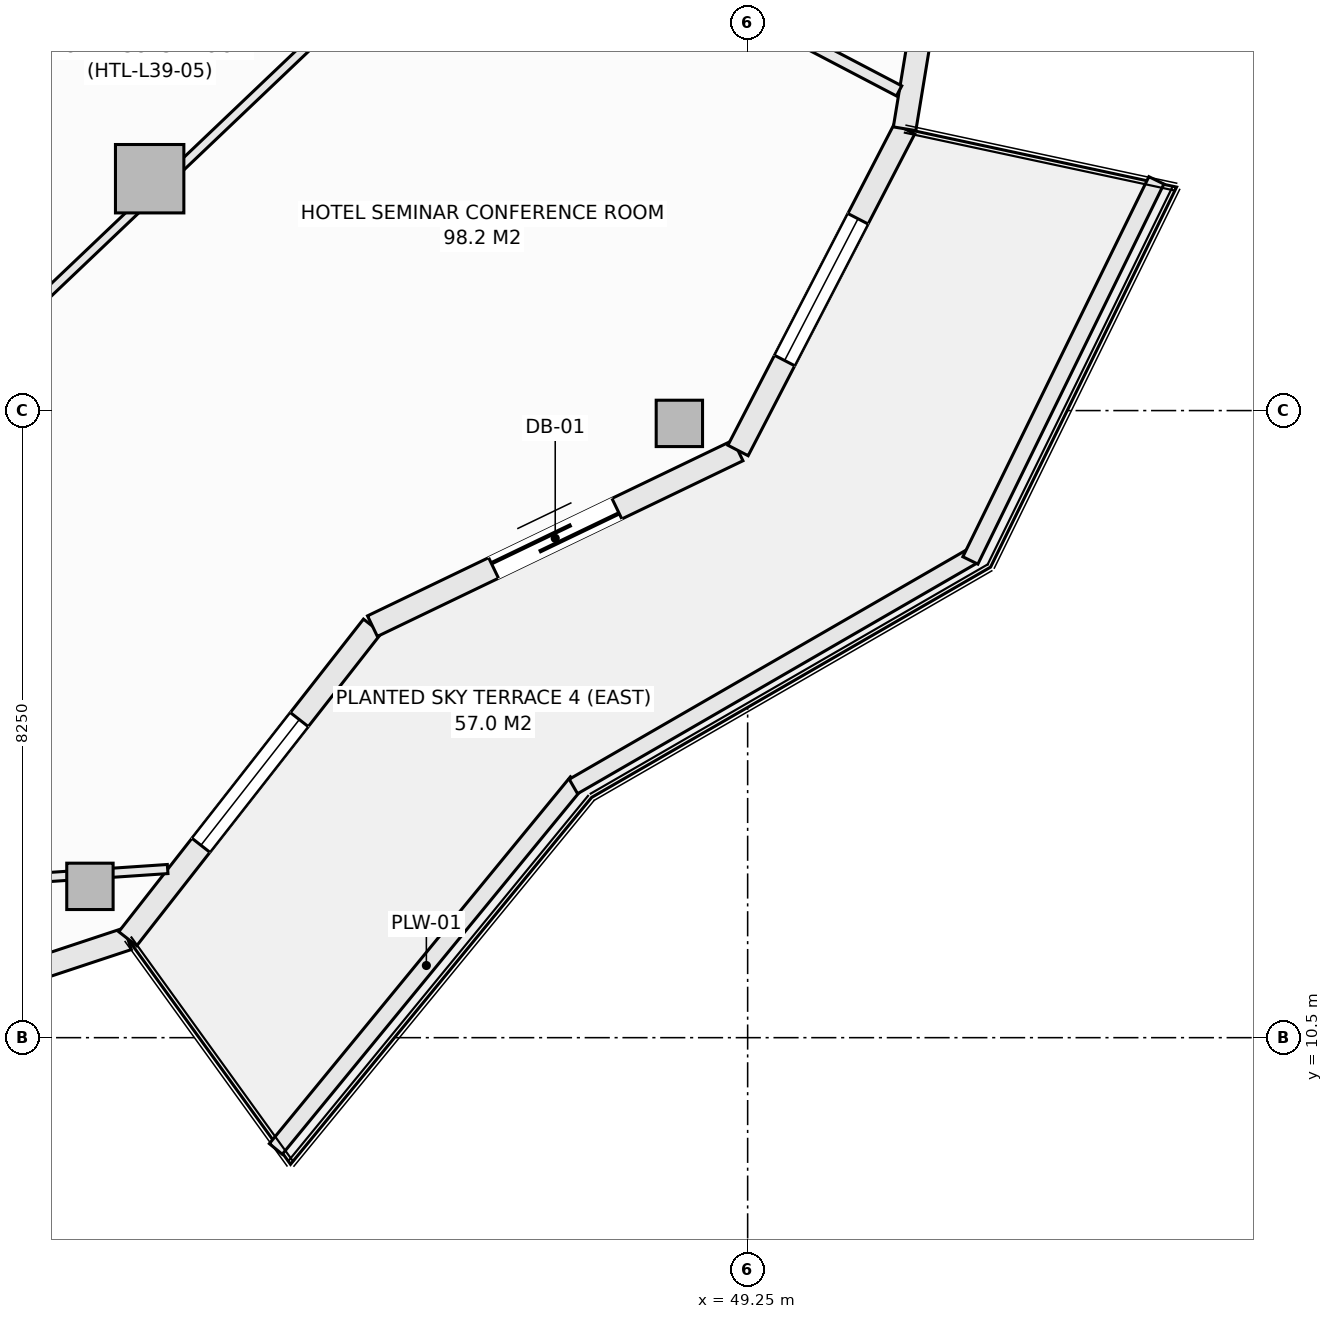
"""IFC4 building model, lengths in metres.
Left out: names, types, materials, properties, quantities, classifications, styles, units other than length and angle.
Written with IfcOpenShell. Run it as: python <this file> out.ifc"""

import sys

from ifc_helpers import new_model, si_unit, direction, frame, frame_2d, origin, origin_2d, place, context, subcontext, project, spatial, rectangle, hollow_rectangle, extrude, element, fill, save


model = new_model("IFC4")
c1 = context("Model", 3, precision=1e-05, world=origin(), true_north=direction((0.0, 1.0)))
c2 = subcontext(c1, "Body", "Model", "MODEL_VIEW")
j1 = project(units=[si_unit("LENGTHUNIT", "METRE"), si_unit("PLANEANGLEUNIT", "RADIAN")], contexts=[c1])
p1 = place(None, origin())
s1 = spatial("IfcSite", under=j1, at=p1, CompositionType="ELEMENT")
p2 = place(p1, origin())
s2 = spatial("IfcBuilding", under=s1, at=p2, CompositionType="ELEMENT")
p3 = place(p2, frame((0.0, 0.0, 152.9)))
s3 = spatial("IfcBuildingStorey", under=s2, at=p3, CompositionType="ELEMENT", Elevation=152.9)
for number, where, z_axis, x_axis in (
    (1, (40.596, 12.49, -0.27), (0.0, 0.0, 1.0), (1.0, 0.0, 0.0)),
    (2, (48.352, 18.581, -0.27), (0.0, 0.0, 1.0), (1.0, 0.0, 0.0)),
):
    element("IfcColumn", number, at=place(p3, frame(where, z_axis=z_axis, x_axis=x_axis)), inside=s3, PredefinedType="COLUMN", context=c2, shape_type="SweptSolid", body=[
        extrude(hollow_rectangle(XDim=0.61, YDim=0.61, WallThickness=0.025, at=origin_2d()), origin(), (0.0, 0.0, 1.0), 3.4),
    ])
p4 = place(p3, frame((41.382, 21.801, -0.27), z_axis=(0.0, 0.0, 1.0), x_axis=(1.0, 0.0, 0.0)))
e3 = element("IfcColumn", 3, at=p4, inside=s3, PredefinedType="COLUMN", context=c2, shape_type="SweptSolid", body=[
    extrude(rectangle(XDim=0.9, YDim=0.9, at=origin_2d()), origin(), (0.0, 0.0, 1.0), 3.4),
])
p5 = place(p3, frame((35.803, 10.048, 0.0), z_axis=(0.0, 0.0, 1.0), x_axis=(0.949246811547, 0.314532177636, 0.0)))
e4 = element("IfcWall", 4, at=p5, inside=s3, PredefinedType="SOLIDWALL", context=c2, shape_type="SweptSolid", body=[
    extrude(rectangle(XDim=5.574, YDim=0.3, at=frame_2d((2.787, 0.0))), origin(), (0.0, 0.0, 1.0), 2.653),
])
p6 = place(p5, frame((1.737, 0.0, 0.74)))
e5 = element("IfcOpeningElement", 5, at=p6, cuts=e4, PredefinedType="OPENING", context=c2, shape_type="SweptSolid", body=[
    extrude(rectangle(XDim=2.1, YDim=1.7, at=frame_2d((1.05, 0.85))), frame((0.0, 0.16, 0.0), z_axis=(0.0, -1.0, 0.0), x_axis=(1.0, 0.0, 0.0)), (0.0, 0.0, 1.0), 0.32),
])
p7 = place(p3, frame((41.094, 11.801, 0.0), z_axis=(0.0, 0.0, 1.0), x_axis=(0.616429245738, 0.787410302828, 0.0)))
e6 = element("IfcWall", 6, at=p7, inside=s3, PredefinedType="SOLIDWALL", context=c2, shape_type="SweptSolid", body=[
    extrude(rectangle(XDim=5.223, YDim=0.3, at=frame_2d((2.612, 0.0))), origin(), (0.0, 0.0, 1.0), 2.653),
])
p8 = place(p7, frame((1.562, 0.0, 0.74)))
e7 = element("IfcOpeningElement", 7, at=p8, cuts=e6, PredefinedType="OPENING", context=c2, shape_type="SweptSolid", body=[
    extrude(rectangle(XDim=2.1, YDim=1.7, at=frame_2d((1.05, 0.85))), frame((0.0, 0.16, 0.0), z_axis=(0.0, -1.0, 0.0), x_axis=(1.0, 0.0, 0.0)), (0.0, 0.0, 1.0), 0.32),
])
p9 = place(p3, frame((44.313, 15.914, 0.0), z_axis=(0.0, 0.0, 1.0), x_axis=(0.901353070301, 0.433085029363, 0.0)))
e8 = element("IfcWall", 8, at=p9, inside=s3, PredefinedType="SOLIDWALL", context=c2, shape_type="SweptSolid", body=[
    extrude(rectangle(XDim=5.336, YDim=0.3, at=frame_2d((2.668, 0.0))), origin(), (0.0, 0.0, 1.0), 2.653),
])
p10 = place(p9, frame((1.768, 0.0, 0.0)))
e9 = element("IfcOpeningElement", 9, at=p10, cuts=e8, PredefinedType="OPENING", context=c2, shape_type="SweptSolid", body=[
    extrude(rectangle(XDim=1.8, YDim=2.25, at=frame_2d((0.9, 1.125))), frame((0.0, 0.16, 0.0), z_axis=(0.0, -1.0, 0.0), x_axis=(1.0, 0.0, 0.0)), (0.0, 0.0, 1.0), 0.32),
])
p11 = place(p3, frame((49.123, 18.225, 0.0), z_axis=(0.0, 0.0, 1.0), x_axis=(0.459810251451, 0.888017191647, 0.0)))
e10 = element("IfcWall", 10, at=p11, inside=s3, PredefinedType="SOLIDWALL", context=c2, shape_type="SweptSolid", body=[
    extrude(rectangle(XDim=4.766, YDim=0.3, at=frame_2d((2.383, 0.0))), origin(), (0.0, 0.0, 1.0), 2.653),
])
p12 = place(p11, frame((1.333, 0.0, 0.74)))
e11 = element("IfcOpeningElement", 11, at=p12, cuts=e10, PredefinedType="OPENING", context=c2, shape_type="SweptSolid", body=[
    extrude(rectangle(XDim=2.1, YDim=1.7, at=frame_2d((1.05, 0.85))), frame((0.0, 0.16, 0.0), z_axis=(0.0, -1.0, 0.0), x_axis=(1.0, 0.0, 0.0)), (0.0, 0.0, 1.0), 0.32),
])
p13 = place(p3, frame((51.315, 22.458, 0.0), z_axis=(0.0, 0.0, 1.0), x_axis=(0.162394765401, 0.986725868806, 0.0)))
e12 = element("IfcWall", 12, at=p13, inside=s3, PredefinedType="SOLIDWALL", context=c2, shape_type="SweptSolid", body=[
    extrude(rectangle(XDim=4.603, YDim=0.3, at=frame_2d((2.302, 0.0))), origin(), (0.0, 0.0, 1.0), 2.653),
])
p14 = place(p13, frame((1.252, 0.0, 0.74)))
e13 = element("IfcOpeningElement", 13, at=p14, cuts=e12, PredefinedType="OPENING", context=c2, shape_type="SweptSolid", body=[
    extrude(rectangle(XDim=2.1, YDim=1.7, at=frame_2d((1.05, 0.85))), frame((0.0, 0.16, 0.0), z_axis=(0.0, -1.0, 0.0), x_axis=(1.0, 0.0, 0.0)), (0.0, 0.0, 1.0), 0.32),
])
p15 = place(p3, frame((43.042, 9.036, 0.0), z_axis=(0.0, 0.0, 1.0), x_axis=(0.634429234628, 0.77298094818, 0.0)))
e14 = element("IfcWall", 14, at=p15, inside=s3, PredefinedType="PARAPET", context=c2, shape_type="SweptSolid", body=[
    extrude(rectangle(XDim=6.245, YDim=0.22, at=frame_2d((3.123, 0.0))), origin(), (0.0, 0.0, 1.0), 0.52),
])
p16 = place(p3, frame((46.958, 13.805, 0.0), z_axis=(0.0, 0.0, 1.0), x_axis=(0.866058128659, 0.499943314571, 0.0)))
e15 = element("IfcWall", 15, at=p16, inside=s3, PredefinedType="PARAPET", context=c2, shape_type="SweptSolid", body=[
    extrude(rectangle(XDim=6.06, YDim=0.22, at=frame_2d((3.03, 0.0))), origin(), (0.0, 0.0, 1.0), 0.52),
])
p17 = place(p3, frame((52.18, 16.779, 0.0), z_axis=(0.0, 0.0, 1.0), x_axis=(0.439637174641, 0.898175458735, 0.0)))
e16 = element("IfcWall", 16, at=p17, inside=s3, PredefinedType="PARAPET", context=c2, shape_type="SweptSolid", body=[
    extrude(rectangle(XDim=5.567, YDim=0.22, at=frame_2d((2.784, 0.0))), origin(), (0.0, 0.0, 1.0), 0.52),
])
p18 = place(p3, frame((38.962, 29.386, 0.0), z_axis=(0.0, 0.0, 1.0), x_axis=(0.885905291329, -0.463866160434, 0.0)))
e17 = element("IfcWall", 17, at=p18, inside=s3, PredefinedType="PARTITIONING", context=c2, shape_type="SweptSolid", body=[
    extrude(rectangle(XDim=13.863, YDim=0.15, at=frame_2d((6.931, 0.0))), origin(), (0.0, 0.0, 1.0), 2.505),
])
p19 = place(p3, frame((39.021, 19.324, 0.0), z_axis=(0.0, 0.0, 1.0), x_axis=(0.724517158733, 0.689256763986, 0.0)))
e18 = element("IfcWall", 18, at=p19, inside=s3, PredefinedType="PARTITIONING", context=c2, shape_type="SweptSolid", body=[
    extrude(rectangle(XDim=9.306, YDim=0.12, at=frame_2d((4.653, 0.0))), origin(), (0.0, 0.0, 1.0), 2.505),
])
p20 = place(p3, frame((36.012, 12.34, 0.0), z_axis=(0.0, 0.0, 1.0), x_axis=(0.997733146572, 0.067294637466, 0.0)))
e19 = element("IfcWall", 19, at=p20, inside=s3, PredefinedType="PARTITIONING", context=c2, shape_type="SweptSolid", body=[
    extrude(rectangle(XDim=5.62, YDim=0.12, at=frame_2d((2.81, 0.0))), origin(), (0.0, 0.0, 1.0), 2.653),
])
p21 = place(p8, origin())
e20 = element("IfcWindow", 20, at=p21, inside=s3, PartitioningType="SINGLE_PANEL", PredefinedType="WINDOW", context=c2, shape_type="SweptSolid", body=[
    extrude(rectangle(XDim=2.1, YDim=1.7, at=frame_2d((1.05, 0.85))), frame((0.0, 0.03, 0.0), z_axis=(0.0, -1.0, 0.0), x_axis=(1.0, 0.0, 0.0)), (0.0, 0.0, 1.0), 0.06),
])
fill(e7, e20)
p22 = place(p10, frame((1.8, 0.0, 0.0), z_axis=(0.0, 0.0, 1.0), x_axis=(-1.0, 0.0, 0.0)))
e21 = element("IfcDoor", 21, at=p22, inside=s3, OperationType="SLIDING_TO_LEFT", PredefinedType="DOOR", context=c2, shape_type="SweptSolid", body=[
    extrude(rectangle(XDim=1.8, YDim=2.25, at=frame_2d((0.9, 1.125))), frame((0.0, 0.025, 0.0), z_axis=(0.0, -1.0, 0.0), x_axis=(1.0, 0.0, 0.0)), (0.0, 0.0, 1.0), 0.05),
])
fill(e9, e21)
p23 = place(p12, origin())
e22 = element("IfcWindow", 22, at=p23, inside=s3, PartitioningType="SINGLE_PANEL", PredefinedType="WINDOW", context=c2, shape_type="SweptSolid", body=[
    extrude(rectangle(XDim=2.1, YDim=1.7, at=frame_2d((1.05, 0.85))), frame((0.0, 0.03, 0.0), z_axis=(0.0, -1.0, 0.0), x_axis=(1.0, 0.0, 0.0)), (0.0, 0.0, 1.0), 0.06),
])
fill(e11, e22)
save(model, sys.argv[1])
